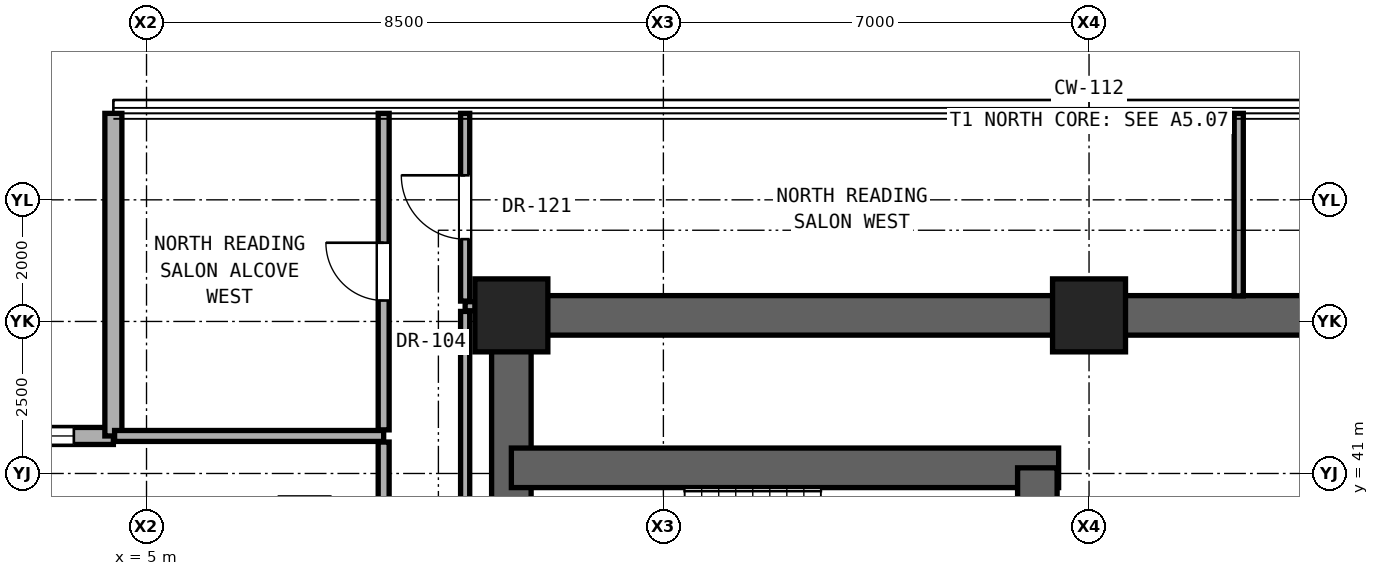
"""IFC4 building model, lengths in metres.
Left out: names, types, materials, properties, quantities, classifications, styles, units other than length and angle.
Written with IfcOpenShell. Run it as: python <this file> out.ifc"""

import sys

from ifc_helpers import new_model, si_unit, direction, frame, frame_2d, origin, origin_2d, place, context, subcontext, project, spatial, rectangle, extrude, element, fill, save


model = new_model("IFC4")
c1 = context("Model", 3, precision=1e-05, world=origin(), true_north=direction((0.0, 1.0)))
c2 = subcontext(c1, "Body", "Model", "MODEL_VIEW")
j1 = project(units=[si_unit("LENGTHUNIT", "METRE"), si_unit("PLANEANGLEUNIT", "RADIAN")], contexts=[c1])
p1 = place(None, origin())
s1 = spatial("IfcSite", under=j1, at=p1, CompositionType="ELEMENT")
p2 = place(p1, origin())
s2 = spatial("IfcBuilding", under=s1, at=p2, CompositionType="ELEMENT")
p3 = place(p2, frame((0.0, 0.0, 101.6)))
s3 = spatial("IfcBuildingStorey", under=s2, at=p3, CompositionType="ELEMENT", Elevation=101.6)
for number, where, z_axis, x_axis in (
    (1, (11.0, 43.6, 0.0), (0.0, 0.0, 1.0), (1.0, 0.0, 0.0)),
    (2, (20.5, 43.6, 0.0), (0.0, 0.0, 1.0), (1.0, 0.0, 0.0)),
):
    element("IfcColumn", number, at=place(p3, frame(where, z_axis=z_axis, x_axis=x_axis)), inside=s3, PredefinedType="COLUMN", context=c2, shape_type="SweptSolid", body=[
        extrude(rectangle(XDim=1.2, YDim=1.2, at=origin_2d()), origin(), (0.0, 0.0, 1.0), 3.3),
    ])
p4 = place(p3, frame((11.0, 43.6, 0.0), z_axis=(0.0, 0.0, 1.0), x_axis=(1.0, 0.0, 0.0)))
e3 = element("IfcWall", 3, at=p4, inside=s3, PredefinedType="SHEAR", context=c2, shape_type="SweptSolid", body=[
    extrude(rectangle(XDim=19.0, YDim=0.65, at=frame_2d((9.5, 0.0))), origin(), (0.0, 0.0, 1.0), 3.08),
])
p5 = place(p3, frame((11.0, 37.6, 0.0), z_axis=(0.0, 0.0, 1.0), x_axis=(0.0, 1.0, 0.0)))
e4 = element("IfcWall", 4, at=p5, inside=s3, PredefinedType="SHEAR", context=c2, shape_type="SweptSolid", body=[
    extrude(rectangle(XDim=6.0, YDim=0.65, at=frame_2d((3.0, 0.0))), origin(), (0.0, 0.0, 1.0), 3.08),
])
p6 = place(p3, frame((11.0, 41.093, 0.0), z_axis=(0.0, 0.0, 1.0), x_axis=(1.0, 0.0, 0.0)))
e5 = element("IfcWall", 5, at=p6, inside=s3, PredefinedType="SHEAR", context=c2, shape_type="SweptSolid", body=[
    extrude(rectangle(XDim=9.0, YDim=0.65, at=frame_2d((4.5, 0.0))), origin(), (0.0, 0.0, 1.0), 3.08),
])
p7 = place(p3, frame((19.65, 37.6, 0.0), z_axis=(0.0, 0.0, 1.0), x_axis=(0.0, 1.0, 0.0)))
e6 = element("IfcWall", 6, at=p7, inside=s3, PredefinedType="SHEAR", context=c2, shape_type="SweptSolid", body=[
    extrude(rectangle(XDim=3.493, YDim=0.65, at=frame_2d((1.747, 0.0))), origin(), (0.0, 0.0, 1.0), 3.08),
])
p8 = place(p3, frame((4.455, 41.617, 0.0), z_axis=(0.0, 0.0, 1.0), x_axis=(-1.0, 0.0, 0.0)))
e7 = element("IfcWall", 7, at=p8, inside=s3, PredefinedType="SOLIDWALL", context=c2, shape_type="SweptSolid", body=[
    extrude(rectangle(XDim=5.305, YDim=0.28, at=frame_2d((2.653, 0.0))), origin(), (0.0, 0.0, 1.0), 3.06),
])
p9 = place(p8, frame((0.65, 0.0, 0.85)))
e8 = element("IfcOpeningElement", 8, at=p9, cuts=e7, PredefinedType="OPENING", context=c2, shape_type="SweptSolid", body=[
    extrude(rectangle(XDim=1.1, YDim=2.0, at=frame_2d((0.55, 1.0))), frame((0.0, 0.15, 0.0), z_axis=(0.0, -1.0, 0.0), x_axis=(1.0, 0.0, 0.0)), (0.0, 0.0, 1.0), 0.3),
])
p10 = place(p3, frame((4.455, 46.922, 0.0), z_axis=(0.0, 0.0, 1.0), x_axis=(0.0, -1.0, 0.0)))
e9 = element("IfcWall", 9, at=p10, inside=s3, PredefinedType="SOLIDWALL", context=c2, shape_type="SweptSolid", body=[
    extrude(rectangle(XDim=5.305, YDim=0.28, at=frame_2d((2.653, 0.0))), origin(), (0.0, 0.0, 1.0), 3.06),
])
p11 = place(p3, frame((4.475, 41.617, 0.0), z_axis=(0.0, 0.0, 1.0), x_axis=(1.0, 0.0, 0.0)))
e10 = element("IfcWall", 10, at=p11, inside=s3, PredefinedType="PARTITIONING", context=c2, shape_type="SweptSolid", body=[
    extrude(rectangle(XDim=4.425, YDim=0.18, at=frame_2d((2.212, 0.0))), origin(), (0.0, 0.0, 1.0), 3.08),
])
p12 = place(p3, frame((10.24, 43.75, 0.0), z_axis=(0.0, 0.0, 1.0), x_axis=(1.0, 0.0, 0.0)))
e11 = element("IfcWall", 11, at=p12, inside=s3, PredefinedType="PARTITIONING", context=c2, shape_type="SweptSolid", body=[
    extrude(rectangle(XDim=0.44, YDim=0.15, at=frame_2d((0.22, 0.0))), origin(), (0.0, 0.0, 1.0), 3.08),
])
p13 = place(p3, frame((8.9, 37.068, 0.0), z_axis=(0.0, 0.0, 1.0), x_axis=(0.0, 1.0, 0.0)))
e12 = element("IfcWall", 12, at=p13, inside=s3, PredefinedType="PARTITIONING", context=c2, shape_type="SweptSolid", body=[
    extrude(rectangle(XDim=4.449, YDim=0.18, at=frame_2d((2.225, 0.0))), origin(), (0.0, 0.0, 1.0), 2.456),
])
p14 = place(p13, frame((1.1, 0.0, 0.0)))
e13 = element("IfcOpeningElement", 13, at=p14, cuts=e12, PredefinedType="OPENING", context=c2, shape_type="SweptSolid", body=[
    extrude(rectangle(XDim=1.05, YDim=2.2, at=frame_2d((0.525, 1.1))), frame((0.0, 0.1, 0.0), z_axis=(0.0, -1.0, 0.0), x_axis=(1.0, 0.0, 0.0)), (0.0, 0.0, 1.0), 0.2),
])
p15 = place(p3, frame((8.9, 41.717, 0.0), z_axis=(0.0, 0.0, 1.0), x_axis=(0.0, 1.0, 0.0)))
e14 = element("IfcWall", 14, at=p15, inside=s3, PredefinedType="PARTITIONING", context=c2, shape_type="SweptSolid", body=[
    extrude(rectangle(XDim=5.205, YDim=0.18, at=frame_2d((2.603, 0.0))), origin(), (0.0, 0.0, 1.0), 3.08),
])
p16 = place(p15, frame((2.127, 0.0, 0.0)))
e15 = element("IfcOpeningElement", 15, at=p16, cuts=e14, PredefinedType="OPENING", context=c2, shape_type="SweptSolid", body=[
    extrude(rectangle(XDim=0.95, YDim=2.15, at=frame_2d((0.475, 1.075))), frame((0.0, 0.1, 0.0), z_axis=(0.0, -1.0, 0.0), x_axis=(1.0, 0.0, 0.0)), (0.0, 0.0, 1.0), 0.2),
])
p17 = place(p3, frame((10.24, 34.535, 0.0), z_axis=(0.0, 0.0, 1.0), x_axis=(0.0, 1.0, 0.0)))
e16 = element("IfcWall", 16, at=p17, inside=s3, PredefinedType="PARTITIONING", context=c2, shape_type="SweptSolid", body=[
    extrude(rectangle(XDim=9.13, YDim=0.15, at=frame_2d((4.565, 0.0))), origin(), (0.0, 0.0, 1.0), 2.456),
])
p18 = place(p3, frame((10.24, 43.835, 0.0), z_axis=(0.0, 0.0, 1.0), x_axis=(0.0, 1.0, 0.0)))
e17 = element("IfcWall", 17, at=p18, inside=s3, PredefinedType="PARTITIONING", context=c2, shape_type="SweptSolid", body=[
    extrude(rectangle(XDim=3.087, YDim=0.15, at=frame_2d((1.543, 0.0))), origin(), (0.0, 0.0, 1.0), 3.08),
])
p19 = place(p18, frame((1.019, 0.0, 0.0)))
e18 = element("IfcOpeningElement", 18, at=p19, cuts=e17, PredefinedType="OPENING", context=c2, shape_type="SweptSolid", body=[
    extrude(rectangle(XDim=1.05, YDim=2.2, at=frame_2d((0.525, 1.1))), frame((0.0, 0.085, 0.0), z_axis=(0.0, -1.0, 0.0), x_axis=(1.0, 0.0, 0.0)), (0.0, 0.0, 1.0), 0.17),
])
p20 = place(p3, frame((22.962, 43.92, 0.0), z_axis=(0.0, 0.0, 1.0), x_axis=(0.0, 1.0, 0.0)))
e19 = element("IfcWall", 19, at=p20, inside=s3, PredefinedType="PARTITIONING", context=c2, shape_type="SweptSolid", body=[
    extrude(rectangle(XDim=3.002, YDim=0.15, at=frame_2d((1.501, 0.0))), origin(), (0.0, 0.0, 1.0), 3.08),
])
p21 = place(p9, origin())
e20 = element("IfcWindow", 20, at=p21, inside=s3, PartitioningType="SINGLE_PANEL", PredefinedType="WINDOW", context=c2, shape_type="SweptSolid", body=[
    extrude(rectangle(XDim=1.1, YDim=2.0, at=frame_2d((0.55, 1.0))), frame((0.0, 0.03, 0.0), z_axis=(0.0, -1.0, 0.0), x_axis=(1.0, 0.0, 0.0)), (0.0, 0.0, 1.0), 0.06),
])
fill(e8, e20)
p22 = place(p19, origin())
e21 = element("IfcDoor", 21, at=p22, inside=s3, OperationType="SINGLE_SWING_RIGHT", PredefinedType="DOOR", context=c2, shape_type="SweptSolid", body=[
    extrude(rectangle(XDim=1.05, YDim=2.2, at=frame_2d((0.525, 1.1))), frame((0.0, 0.025, 0.0), z_axis=(0.0, -1.0, 0.0), x_axis=(1.0, 0.0, 0.0)), (0.0, 0.0, 1.0), 0.05),
])
fill(e18, e21)
p23 = place(p16, origin())
e22 = element("IfcDoor", 22, at=p23, inside=s3, OperationType="SINGLE_SWING_RIGHT", PredefinedType="DOOR", context=c2, shape_type="SweptSolid", body=[
    extrude(rectangle(XDim=0.95, YDim=2.15, at=frame_2d((0.475, 1.075))), frame((0.0, 0.025, 0.0), z_axis=(0.0, -1.0, 0.0), x_axis=(1.0, 0.0, 0.0)), (0.0, 0.0, 1.0), 0.05),
])
fill(e15, e22)
save(model, sys.argv[1])
